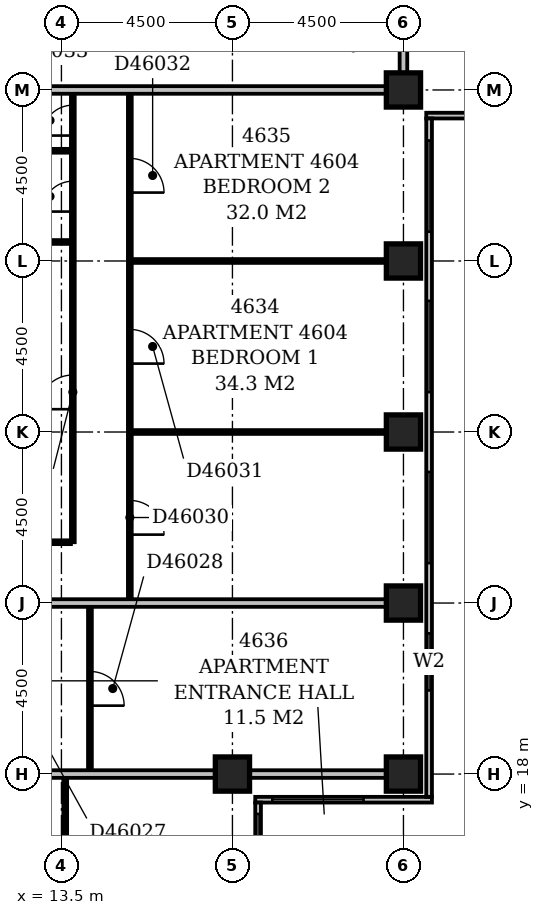
"""IFC4 building model, lengths in metres.
Left out: names, types, materials, properties, quantities, classifications, styles, units other than length and angle.
Written with IfcOpenShell. Run it as: python <this file> out.ifc"""

import sys

from ifc_helpers import new_model, si_unit, direction, frame, frame_2d, origin, origin_2d, place, context, subcontext, project, spatial, rectangle, extrude, element, fill, save


model = new_model("IFC4")
c1 = context("Model", 3, precision=1e-05, world=origin(), true_north=direction((0.0, 1.0)))
c2 = subcontext(c1, "Body", "Model", "MODEL_VIEW")
j1 = project(units=[si_unit("LENGTHUNIT", "METRE"), si_unit("PLANEANGLEUNIT", "RADIAN")], contexts=[c1])
p1 = place(None, origin())
s1 = spatial("IfcSite", under=j1, at=p1, CompositionType="ELEMENT")
p2 = place(p1, origin())
s2 = spatial("IfcBuilding", under=s1, at=p2, CompositionType="ELEMENT")
p3 = place(p2, frame((0.0, 0.0, 182.6)))
s3 = spatial("IfcBuildingStorey", under=s2, at=p3, CompositionType="ELEMENT", Elevation=182.6)
for number, where, z_axis, x_axis in (
    (1, (18.0, 18.0, -0.3), (0.0, 0.0, 1.0), (1.0, 0.0, 0.0)),
    (2, (22.5, 18.0, -0.3), (0.0, 0.0, 1.0), (1.0, 0.0, 0.0)),
    (3, (22.5, 22.5, -0.3), (0.0, 0.0, 1.0), (1.0, 0.0, 0.0)),
    (4, (22.5, 27.0, -0.3), (0.0, 0.0, 1.0), (1.0, 0.0, 0.0)),
    (5, (22.5, 31.5, -0.3), (0.0, 0.0, 1.0), (1.0, 0.0, 0.0)),
    (6, (22.5, 36.0, -0.3), (0.0, 0.0, 1.0), (1.0, 0.0, 0.0)),
):
    element("IfcColumn", number, at=place(p3, frame(where, z_axis=z_axis, x_axis=x_axis)), inside=s3, PredefinedType="COLUMN", context=c2, shape_type="SweptSolid", body=[
        extrude(rectangle(XDim=0.9, YDim=0.9, at=origin_2d()), origin(), (0.0, 0.0, 1.0), 3.55),
    ])
p4 = place(p3, frame((18.675, 8.4, 0.0), z_axis=(0.0, 0.0, 1.0), x_axis=(0.0, 1.0, 0.0)))
e7 = element("IfcWall", 7, at=p4, inside=s3, PredefinedType="STANDARD", context=c2, shape_type="SweptSolid", body=[
    extrude(rectangle(XDim=8.85, YDim=0.15, at=frame_2d((4.425, 0.0))), origin(), (0.0, 0.0, 1.0), 2.7),
])
p5 = place(p4, frame((1.871, 0.0, 0.6)))
e8 = element("IfcOpeningElement", 8, at=p5, cuts=e7, PredefinedType="OPENING", context=c2, shape_type="SweptSolid", body=[
    extrude(rectangle(XDim=2.4, YDim=1.8, at=frame_2d((1.2, 0.9))), frame((0.0, 0.087, 0.0), z_axis=(0.0, -1.0, 0.0), x_axis=(1.0, 0.0, 0.0)), (0.0, 0.0, 1.0), 0.174),
])
p6 = place(p4, frame((6.15, 0.0, 0.6)))
e9 = element("IfcOpeningElement", 9, at=p6, cuts=e7, PredefinedType="OPENING", context=c2, shape_type="SweptSolid", body=[
    extrude(rectangle(XDim=2.4, YDim=1.8, at=frame_2d((1.2, 0.9))), frame((0.0, 0.087, 0.0), z_axis=(0.0, -1.0, 0.0), x_axis=(1.0, 0.0, 0.0)), (0.0, 0.0, 1.0), 0.174),
])
p7 = place(p3, frame((18.6, 17.325, 0.0), z_axis=(0.0, 0.0, 1.0), x_axis=(1.0, 0.0, 0.0)))
e10 = element("IfcWall", 10, at=p7, inside=s3, PredefinedType="STANDARD", context=c2, shape_type="SweptSolid", body=[
    extrude(rectangle(XDim=4.65, YDim=0.15, at=frame_2d((2.325, 0.0))), origin(), (0.0, 0.0, 1.0), 2.7),
])
p8 = place(p7, frame((0.45, 0.0, 0.6)))
e11 = element("IfcOpeningElement", 11, at=p8, cuts=e10, PredefinedType="OPENING", context=c2, shape_type="SweptSolid", body=[
    extrude(rectangle(XDim=2.4, YDim=1.8, at=frame_2d((1.2, 0.9))), frame((0.0, 0.087, 0.0), z_axis=(0.0, -1.0, 0.0), x_axis=(1.0, 0.0, 0.0)), (0.0, 0.0, 1.0), 0.174),
])
p9 = place(p3, frame((23.175, 17.4, 0.0), z_axis=(0.0, 0.0, 1.0), x_axis=(0.0, 1.0, 0.0)))
e12 = element("IfcWall", 12, at=p9, inside=s3, PredefinedType="STANDARD", context=c2, shape_type="SweptSolid", body=[
    extrude(rectangle(XDim=17.85, YDim=0.15, at=frame_2d((8.925, 0.0))), origin(), (0.0, 0.0, 1.0), 2.7),
])
p10 = place(p9, frame((2.802, 0.0, 0.6)))
e13 = element("IfcOpeningElement", 13, at=p10, cuts=e12, PredefinedType="OPENING", context=c2, shape_type="SweptSolid", body=[
    extrude(rectangle(XDim=1.5, YDim=1.8, at=frame_2d((0.75, 0.9))), frame((0.0, 0.087, 0.0), z_axis=(0.0, -1.0, 0.0), x_axis=(1.0, 0.0, 0.0)), (0.0, 0.0, 1.0), 0.174),
])
p11 = place(p9, frame((6.15, 0.0, 0.6)))
e14 = element("IfcOpeningElement", 14, at=p11, cuts=e12, PredefinedType="OPENING", context=c2, shape_type="SweptSolid", body=[
    extrude(rectangle(XDim=2.4, YDim=1.8, at=frame_2d((1.2, 0.9))), frame((0.0, 0.087, 0.0), z_axis=(0.0, -1.0, 0.0), x_axis=(1.0, 0.0, 0.0)), (0.0, 0.0, 1.0), 0.174),
])
p12 = place(p9, frame((10.65, 0.0, 0.6)))
e15 = element("IfcOpeningElement", 15, at=p12, cuts=e12, PredefinedType="OPENING", context=c2, shape_type="SweptSolid", body=[
    extrude(rectangle(XDim=2.4, YDim=1.8, at=frame_2d((1.2, 0.9))), frame((0.0, 0.087, 0.0), z_axis=(0.0, -1.0, 0.0), x_axis=(1.0, 0.0, 0.0)), (0.0, 0.0, 1.0), 0.174),
])
p13 = place(p9, frame((14.869, 0.0, 0.6)))
e16 = element("IfcOpeningElement", 16, at=p13, cuts=e12, PredefinedType="OPENING", context=c2, shape_type="SweptSolid", body=[
    extrude(rectangle(XDim=2.4, YDim=1.8, at=frame_2d((1.2, 0.9))), frame((0.0, 0.087, 0.0), z_axis=(0.0, -1.0, 0.0), x_axis=(1.0, 0.0, 0.0)), (0.0, 0.0, 1.0), 0.174),
])
p14 = place(p3, frame((23.1, 35.325, 0.0), z_axis=(0.0, 0.0, 1.0), x_axis=(1.0, 0.0, 0.0)))
e17 = element("IfcWall", 17, at=p14, inside=s3, PredefinedType="STANDARD", context=c2, shape_type="SweptSolid", body=[
    extrude(rectangle(XDim=45.15, YDim=0.15, at=frame_2d((22.575, 0.0))), origin(), (0.0, 0.0, 1.0), 2.7),
])
p15 = place(p14, frame((1.989, 0.0, 0.6)))
e18 = element("IfcOpeningElement", 18, at=p15, cuts=e17, PredefinedType="OPENING", context=c2, shape_type="SweptSolid", body=[
    extrude(rectangle(XDim=1.2, YDim=1.8, at=frame_2d((0.6, 0.9))), frame((0.0, 0.087, 0.0), z_axis=(0.0, -1.0, 0.0), x_axis=(1.0, 0.0, 0.0)), (0.0, 0.0, 1.0), 0.174),
])
p16 = place(p14, frame((4.95, 0.0, 0.6)))
e19 = element("IfcOpeningElement", 19, at=p16, cuts=e17, PredefinedType="OPENING", context=c2, shape_type="SweptSolid", body=[
    extrude(rectangle(XDim=2.4, YDim=1.8, at=frame_2d((1.2, 0.9))), frame((0.0, 0.087, 0.0), z_axis=(0.0, -1.0, 0.0), x_axis=(1.0, 0.0, 0.0)), (0.0, 0.0, 1.0), 0.174),
])
p17 = place(p14, frame((9.45, 0.0, 0.6)))
e20 = element("IfcOpeningElement", 20, at=p17, cuts=e17, PredefinedType="OPENING", context=c2, shape_type="SweptSolid", body=[
    extrude(rectangle(XDim=2.4, YDim=1.8, at=frame_2d((1.2, 0.9))), frame((0.0, 0.087, 0.0), z_axis=(0.0, -1.0, 0.0), x_axis=(1.0, 0.0, 0.0)), (0.0, 0.0, 1.0), 0.174),
])
p18 = place(p14, frame((13.95, 0.0, 0.6)))
e21 = element("IfcOpeningElement", 21, at=p18, cuts=e17, PredefinedType="OPENING", context=c2, shape_type="SweptSolid", body=[
    extrude(rectangle(XDim=2.4, YDim=1.8, at=frame_2d((1.2, 0.9))), frame((0.0, 0.087, 0.0), z_axis=(0.0, -1.0, 0.0), x_axis=(1.0, 0.0, 0.0)), (0.0, 0.0, 1.0), 0.174),
])
p19 = place(p14, frame((18.45, 0.0, 0.6)))
e22 = element("IfcOpeningElement", 22, at=p19, cuts=e17, PredefinedType="OPENING", context=c2, shape_type="SweptSolid", body=[
    extrude(rectangle(XDim=2.4, YDim=1.8, at=frame_2d((1.2, 0.9))), frame((0.0, 0.087, 0.0), z_axis=(0.0, -1.0, 0.0), x_axis=(1.0, 0.0, 0.0)), (0.0, 0.0, 1.0), 0.174),
])
p20 = place(p14, frame((22.589, 0.0, 0.6)))
e23 = element("IfcOpeningElement", 23, at=p20, cuts=e17, PredefinedType="OPENING", context=c2, shape_type="SweptSolid", body=[
    extrude(rectangle(XDim=2.1, YDim=1.8, at=frame_2d((1.05, 0.9))), frame((0.0, 0.087, 0.0), z_axis=(0.0, -1.0, 0.0), x_axis=(1.0, 0.0, 0.0)), (0.0, 0.0, 1.0), 0.174),
])
p21 = place(p14, frame((28.653, 0.0, 0.6)))
e24 = element("IfcOpeningElement", 24, at=p21, cuts=e17, PredefinedType="OPENING", context=c2, shape_type="SweptSolid", body=[
    extrude(rectangle(XDim=1.5, YDim=1.8, at=frame_2d((0.75, 0.9))), frame((0.0, 0.087, 0.0), z_axis=(0.0, -1.0, 0.0), x_axis=(1.0, 0.0, 0.0)), (0.0, 0.0, 1.0), 0.174),
])
p22 = place(p14, frame((31.95, 0.0, 0.6)))
e25 = element("IfcOpeningElement", 25, at=p22, cuts=e17, PredefinedType="OPENING", context=c2, shape_type="SweptSolid", body=[
    extrude(rectangle(XDim=2.4, YDim=1.8, at=frame_2d((1.2, 0.9))), frame((0.0, 0.087, 0.0), z_axis=(0.0, -1.0, 0.0), x_axis=(1.0, 0.0, 0.0)), (0.0, 0.0, 1.0), 0.174),
])
p23 = place(p14, frame((36.45, 0.0, 0.6)))
e26 = element("IfcOpeningElement", 26, at=p23, cuts=e17, PredefinedType="OPENING", context=c2, shape_type="SweptSolid", body=[
    extrude(rectangle(XDim=2.4, YDim=1.8, at=frame_2d((1.2, 0.9))), frame((0.0, 0.087, 0.0), z_axis=(0.0, -1.0, 0.0), x_axis=(1.0, 0.0, 0.0)), (0.0, 0.0, 1.0), 0.174),
])
p24 = place(p14, frame((40.95, 0.0, 0.6)))
e27 = element("IfcOpeningElement", 27, at=p24, cuts=e17, PredefinedType="OPENING", context=c2, shape_type="SweptSolid", body=[
    extrude(rectangle(XDim=2.4, YDim=1.8, at=frame_2d((1.2, 0.9))), frame((0.0, 0.087, 0.0), z_axis=(0.0, -1.0, 0.0), x_axis=(1.0, 0.0, 0.0)), (0.0, 0.0, 1.0), 0.174),
])
p25 = place(p3, frame((13.6, 9.45, 0.0), z_axis=(0.0, 0.0, 1.0), x_axis=(0.0, 1.0, 0.0)))
e28 = element("IfcWall", 28, at=p25, inside=s3, PredefinedType="PARTITIONING", context=c2, shape_type="SweptSolid", body=[
    extrude(rectangle(XDim=8.45, YDim=0.1, at=frame_2d((4.225, 0.0))), origin(), (0.0, 0.0, 1.0), 3.25),
])
p26 = place(p25, frame((1.35, 0.0, 0.0)))
e29 = element("IfcOpeningElement", 29, at=p26, cuts=e28, PredefinedType="OPENING", context=c2, shape_type="SweptSolid", body=[
    extrude(rectangle(XDim=0.9, YDim=2.1, at=frame_2d((0.45, 1.05))), frame((0.0, 0.062, 0.0), z_axis=(0.0, -1.0, 0.0), x_axis=(1.0, 0.0, 0.0)), (0.0, 0.0, 1.0), 0.124),
])
p27 = place(p25, frame((5.85, 0.0, 0.0)))
e30 = element("IfcOpeningElement", 30, at=p27, cuts=e28, PredefinedType="OPENING", context=c2, shape_type="SweptSolid", body=[
    extrude(rectangle(XDim=0.9, YDim=2.1, at=frame_2d((0.45, 1.05))), frame((0.0, 0.062, 0.0), z_axis=(0.0, -1.0, 0.0), x_axis=(1.0, 0.0, 0.0)), (0.0, 0.0, 1.0), 0.124),
])
p28 = place(p3, frame((9.1, 18.0, 0.0), z_axis=(0.0, 0.0, 1.0), x_axis=(1.0, 0.0, 0.0)))
e31 = element("IfcWall", 31, at=p28, inside=s3, PredefinedType="PARTITIONING", context=c2, shape_type="SweptSolid", body=[
    extrude(rectangle(XDim=8.45, YDim=0.2, at=frame_2d((4.225, 0.0))), origin(), (0.0, 0.0, 1.0), 2.55),
])
p29 = place(p3, frame((18.45, 18.0, 0.0), z_axis=(0.0, 0.0, 1.0), x_axis=(1.0, 0.0, 0.0)))
e32 = element("IfcWall", 32, at=p29, inside=s3, PredefinedType="PARTITIONING", context=c2, shape_type="SweptSolid", body=[
    extrude(rectangle(XDim=3.6, YDim=0.2, at=frame_2d((1.8, 0.0))), origin(), (0.0, 0.0, 1.0), 2.7),
])
p30 = place(p3, frame((14.25, 18.1, 0.0), z_axis=(0.0, 0.0, 1.0), x_axis=(0.0, 1.0, 0.0)))
e33 = element("IfcWall", 33, at=p30, inside=s3, PredefinedType="PARTITIONING", context=c2, shape_type="SweptSolid", body=[
    extrude(rectangle(XDim=4.3, YDim=0.1, at=frame_2d((2.15, 0.0))), origin(), (0.0, 0.0, 1.0), 3.25),
])
p31 = place(p30, frame((1.7, 0.0, 0.0)))
e34 = element("IfcOpeningElement", 34, at=p31, cuts=e33, PredefinedType="OPENING", context=c2, shape_type="SweptSolid", body=[
    extrude(rectangle(XDim=0.9, YDim=2.1, at=frame_2d((0.45, 1.05))), frame((0.0, 0.062, 0.0), z_axis=(0.0, -1.0, 0.0), x_axis=(1.0, 0.0, 0.0)), (0.0, 0.0, 1.0), 0.124),
])
p32 = place(p3, frame((9.1, 22.5, 0.0), z_axis=(0.0, 0.0, 1.0), x_axis=(1.0, 0.0, 0.0)))
e35 = element("IfcWall", 35, at=p32, inside=s3, PredefinedType="PARTITIONING", context=c2, shape_type="SweptSolid", body=[
    extrude(rectangle(XDim=12.95, YDim=0.2, at=frame_2d((6.475, 0.0))), origin(), (0.0, 0.0, 1.0), 3.25),
])
p33 = place(p3, frame((15.3, 22.6, 0.0), z_axis=(0.0, 0.0, 1.0), x_axis=(0.0, 1.0, 0.0)))
e36 = element("IfcWall", 36, at=p33, inside=s3, PredefinedType="PARTITIONING", context=c2, shape_type="SweptSolid", body=[
    extrude(rectangle(XDim=13.3, YDim=0.1, at=frame_2d((6.65, 0.0))), origin(), (0.0, 0.0, 1.0), 3.25),
])
p34 = place(p33, frame((1.7, 0.0, 0.0)))
e37 = element("IfcOpeningElement", 37, at=p34, cuts=e36, PredefinedType="OPENING", context=c2, shape_type="SweptSolid", body=[
    extrude(rectangle(XDim=0.9, YDim=2.1, at=frame_2d((0.45, 1.05))), frame((0.0, 0.062, 0.0), z_axis=(0.0, -1.0, 0.0), x_axis=(1.0, 0.0, 0.0)), (0.0, 0.0, 1.0), 0.124),
])
p35 = place(p33, frame((6.2, 0.0, 0.0)))
e38 = element("IfcOpeningElement", 38, at=p35, cuts=e36, PredefinedType="OPENING", context=c2, shape_type="SweptSolid", body=[
    extrude(rectangle(XDim=0.9, YDim=2.1, at=frame_2d((0.45, 1.05))), frame((0.0, 0.062, 0.0), z_axis=(0.0, -1.0, 0.0), x_axis=(1.0, 0.0, 0.0)), (0.0, 0.0, 1.0), 0.124),
])
p36 = place(p33, frame((10.7, 0.0, 0.0)))
e39 = element("IfcOpeningElement", 39, at=p36, cuts=e36, PredefinedType="OPENING", context=c2, shape_type="SweptSolid", body=[
    extrude(rectangle(XDim=0.9, YDim=2.1, at=frame_2d((0.45, 1.05))), frame((0.0, 0.062, 0.0), z_axis=(0.0, -1.0, 0.0), x_axis=(1.0, 0.0, 0.0)), (0.0, 0.0, 1.0), 0.124),
])
p37 = place(p3, frame((9.1, 24.1, 0.0), z_axis=(0.0, 0.0, 1.0), x_axis=(1.0, 0.0, 0.0)))
e40 = element("IfcWall", 40, at=p37, inside=s3, PredefinedType="PARTITIONING", context=c2, shape_type="SweptSolid", body=[
    extrude(rectangle(XDim=4.65, YDim=0.1, at=frame_2d((2.325, 0.0))), origin(), (0.0, 0.0, 1.0), 3.25),
])
p38 = place(p3, frame((13.8, 24.1, 0.0), z_axis=(0.0, 0.0, 1.0), x_axis=(0.0, 1.0, 0.0)))
e41 = element("IfcWall", 41, at=p38, inside=s3, PredefinedType="PARTITIONING", context=c2, shape_type="SweptSolid", body=[
    extrude(rectangle(XDim=11.8, YDim=0.1, at=frame_2d((5.9, 0.0))), origin(), (0.0, 0.0, 1.0), 3.25),
])
p39 = place(p38, frame((8.7, 0.0, 0.0)))
e42 = element("IfcOpeningElement", 42, at=p39, cuts=e41, PredefinedType="OPENING", context=c2, shape_type="SweptSolid", body=[
    extrude(rectangle(XDim=0.8, YDim=2.1, at=frame_2d((0.4, 1.05))), frame((0.0, 0.062, 0.0), z_axis=(0.0, -1.0, 0.0), x_axis=(1.0, 0.0, 0.0)), (0.0, 0.0, 1.0), 0.124),
])
p40 = place(p38, frame((3.5, 0.0, 0.0)))
e43 = element("IfcOpeningElement", 43, at=p40, cuts=e41, PredefinedType="OPENING", context=c2, shape_type="SweptSolid", body=[
    extrude(rectangle(XDim=0.9, YDim=2.1, at=frame_2d((0.45, 1.05))), frame((0.0, 0.062, 0.0), z_axis=(0.0, -1.0, 0.0), x_axis=(1.0, 0.0, 0.0)), (0.0, 0.0, 1.0), 0.124),
])
p41 = place(p38, frame((10.7, 0.0, 0.0)))
e44 = element("IfcOpeningElement", 44, at=p41, cuts=e41, PredefinedType="OPENING", context=c2, shape_type="SweptSolid", body=[
    extrude(rectangle(XDim=0.8, YDim=2.1, at=frame_2d((0.4, 1.05))), frame((0.0, 0.062, 0.0), z_axis=(0.0, -1.0, 0.0), x_axis=(1.0, 0.0, 0.0)), (0.0, 0.0, 1.0), 0.124),
])
p42 = place(p3, frame((15.35, 27.0, 0.0), z_axis=(0.0, 0.0, 1.0), x_axis=(1.0, 0.0, 0.0)))
e45 = element("IfcWall", 45, at=p42, inside=s3, PredefinedType="PARTITIONING", context=c2, shape_type="SweptSolid", body=[
    extrude(rectangle(XDim=6.7, YDim=0.1, at=frame_2d((3.35, 0.0))), origin(), (0.0, 0.0, 1.0), 2.65),
])
p43 = place(p3, frame((15.35, 31.5, 0.0), z_axis=(0.0, 0.0, 1.0), x_axis=(1.0, 0.0, 0.0)))
e46 = element("IfcWall", 46, at=p43, inside=s3, PredefinedType="PARTITIONING", context=c2, shape_type="SweptSolid", body=[
    extrude(rectangle(XDim=6.7, YDim=0.1, at=frame_2d((3.35, 0.0))), origin(), (0.0, 0.0, 1.0), 3.25),
])
for number, where, z_axis, x_axis in (
    (47, (9.1, 32.0, 0.0), (0.0, 0.0, 1.0), (1.0, 0.0, 0.0)),
    (48, (9.1, 34.4, 0.0), (0.0, 0.0, 1.0), (1.0, 0.0, 0.0)),
):
    element("IfcWall", number, at=place(p3, frame(where, z_axis=z_axis, x_axis=x_axis)), inside=s3, PredefinedType="PLUMBINGWALL", context=c2, shape_type="SweptSolid", body=[
        extrude(rectangle(XDim=4.65, YDim=0.1, at=frame_2d((2.325, 0.0))), origin(), (0.0, 0.0, 1.0), 3.25),
    ])
p44 = place(p3, frame((9.1, 36.0, 0.0), z_axis=(0.0, 0.0, 1.0), x_axis=(1.0, 0.0, 0.0)))
e49 = element("IfcWall", 49, at=p44, inside=s3, PredefinedType="PARTITIONING", context=c2, shape_type="SweptSolid", body=[
    extrude(rectangle(XDim=12.95, YDim=0.2, at=frame_2d((6.475, 0.0))), origin(), (0.0, 0.0, 1.0), 3.25),
])
p45 = place(p3, frame((22.5, 36.45, 0.0), z_axis=(0.0, 0.0, 1.0), x_axis=(0.0, 1.0, 0.0)))
e50 = element("IfcWall", 50, at=p45, inside=s3, PredefinedType="PARTITIONING", context=c2, shape_type="SweptSolid", body=[
    extrude(rectangle(XDim=13.05, YDim=0.2, at=frame_2d((6.525, 0.0))), origin(), (0.0, 0.0, 1.0), 3.25),
])
p46 = place(p6, origin())
e51 = element("IfcWindow", 51, at=p46, inside=s3, PartitioningType="SINGLE_PANEL", PredefinedType="WINDOW", context=c2, shape_type="SweptSolid", body=[
    extrude(rectangle(XDim=2.4, YDim=1.8, at=frame_2d((1.2, 0.9))), frame((0.0, 0.03, 0.0), z_axis=(0.0, -1.0, 0.0), x_axis=(1.0, 0.0, 0.0)), (0.0, 0.0, 1.0), 0.06),
])
fill(e9, e51)
p47 = place(p8, origin())
e52 = element("IfcWindow", 52, at=p47, inside=s3, PartitioningType="SINGLE_PANEL", PredefinedType="WINDOW", context=c2, shape_type="SweptSolid", body=[
    extrude(rectangle(XDim=2.4, YDim=1.8, at=frame_2d((1.2, 0.9))), frame((0.0, 0.03, 0.0), z_axis=(0.0, -1.0, 0.0), x_axis=(1.0, 0.0, 0.0)), (0.0, 0.0, 1.0), 0.06),
])
fill(e11, e52)
p48 = place(p10, origin())
e53 = element("IfcWindow", 53, at=p48, inside=s3, PartitioningType="SINGLE_PANEL", PredefinedType="WINDOW", context=c2, shape_type="SweptSolid", body=[
    extrude(rectangle(XDim=1.5, YDim=1.8, at=frame_2d((0.75, 0.9))), frame((0.0, 0.03, 0.0), z_axis=(0.0, -1.0, 0.0), x_axis=(1.0, 0.0, 0.0)), (0.0, 0.0, 1.0), 0.06),
])
fill(e13, e53)
p49 = place(p11, origin())
e54 = element("IfcWindow", 54, at=p49, inside=s3, PartitioningType="SINGLE_PANEL", PredefinedType="WINDOW", context=c2, shape_type="SweptSolid", body=[
    extrude(rectangle(XDim=2.4, YDim=1.8, at=frame_2d((1.2, 0.9))), frame((0.0, 0.03, 0.0), z_axis=(0.0, -1.0, 0.0), x_axis=(1.0, 0.0, 0.0)), (0.0, 0.0, 1.0), 0.06),
])
fill(e14, e54)
p50 = place(p12, origin())
e55 = element("IfcWindow", 55, at=p50, inside=s3, PartitioningType="SINGLE_PANEL", PredefinedType="WINDOW", context=c2, shape_type="SweptSolid", body=[
    extrude(rectangle(XDim=2.4, YDim=1.8, at=frame_2d((1.2, 0.9))), frame((0.0, 0.03, 0.0), z_axis=(0.0, -1.0, 0.0), x_axis=(1.0, 0.0, 0.0)), (0.0, 0.0, 1.0), 0.06),
])
fill(e15, e55)
p51 = place(p13, origin())
e56 = element("IfcWindow", 56, at=p51, inside=s3, PartitioningType="SINGLE_PANEL", PredefinedType="WINDOW", context=c2, shape_type="SweptSolid", body=[
    extrude(rectangle(XDim=2.4, YDim=1.8, at=frame_2d((1.2, 0.9))), frame((0.0, 0.03, 0.0), z_axis=(0.0, -1.0, 0.0), x_axis=(1.0, 0.0, 0.0)), (0.0, 0.0, 1.0), 0.06),
])
fill(e16, e56)
p52 = place(p31, frame((0.9, 0.0, 0.0), z_axis=(0.0, 0.0, 1.0), x_axis=(-1.0, 0.0, 0.0)))
e57 = element("IfcDoor", 57, at=p52, inside=s3, OperationType="SINGLE_SWING_RIGHT", PredefinedType="DOOR", context=c2, shape_type="SweptSolid", body=[
    extrude(rectangle(XDim=0.9, YDim=2.1, at=frame_2d((0.45, 1.05))), frame((0.0, 0.025, 0.0), z_axis=(0.0, -1.0, 0.0), x_axis=(1.0, 0.0, 0.0)), (0.0, 0.0, 1.0), 0.05),
])
fill(e34, e57)
p53 = place(p34, frame((0.9, 0.0, 0.0), z_axis=(0.0, 0.0, 1.0), x_axis=(-1.0, 0.0, 0.0)))
e58 = element("IfcDoor", 58, at=p53, inside=s3, OperationType="SINGLE_SWING_RIGHT", PredefinedType="DOOR", context=c2, shape_type="SweptSolid", body=[
    extrude(rectangle(XDim=0.9, YDim=2.1, at=frame_2d((0.45, 1.05))), frame((0.0, 0.025, 0.0), z_axis=(0.0, -1.0, 0.0), x_axis=(1.0, 0.0, 0.0)), (0.0, 0.0, 1.0), 0.05),
])
fill(e37, e58)
p54 = place(p35, frame((0.9, 0.0, 0.0), z_axis=(0.0, 0.0, 1.0), x_axis=(-1.0, 0.0, 0.0)))
e59 = element("IfcDoor", 59, at=p54, inside=s3, OperationType="SINGLE_SWING_RIGHT", PredefinedType="DOOR", context=c2, shape_type="SweptSolid", body=[
    extrude(rectangle(XDim=0.9, YDim=2.1, at=frame_2d((0.45, 1.05))), frame((0.0, 0.025, 0.0), z_axis=(0.0, -1.0, 0.0), x_axis=(1.0, 0.0, 0.0)), (0.0, 0.0, 1.0), 0.05),
])
fill(e38, e59)
p55 = place(p36, frame((0.9, 0.0, 0.0), z_axis=(0.0, 0.0, 1.0), x_axis=(-1.0, 0.0, 0.0)))
e60 = element("IfcDoor", 60, at=p55, inside=s3, OperationType="SINGLE_SWING_RIGHT", PredefinedType="DOOR", context=c2, shape_type="SweptSolid", body=[
    extrude(rectangle(XDim=0.9, YDim=2.1, at=frame_2d((0.45, 1.05))), frame((0.0, 0.025, 0.0), z_axis=(0.0, -1.0, 0.0), x_axis=(1.0, 0.0, 0.0)), (0.0, 0.0, 1.0), 0.05),
])
fill(e39, e60)
p56 = place(p39, origin())
e61 = element("IfcDoor", 61, at=p56, inside=s3, OperationType="SINGLE_SWING_LEFT", PredefinedType="DOOR", context=c2, shape_type="SweptSolid", body=[
    extrude(rectangle(XDim=0.8, YDim=2.1, at=frame_2d((0.4, 1.05))), frame((0.0, 0.025, 0.0), z_axis=(0.0, -1.0, 0.0), x_axis=(1.0, 0.0, 0.0)), (0.0, 0.0, 1.0), 0.05),
])
fill(e42, e61)
p57 = place(p40, origin())
e62 = element("IfcDoor", 62, at=p57, inside=s3, OperationType="SINGLE_SWING_LEFT", PredefinedType="DOOR", context=c2, shape_type="SweptSolid", body=[
    extrude(rectangle(XDim=0.9, YDim=2.1, at=frame_2d((0.45, 1.05))), frame((0.0, 0.025, 0.0), z_axis=(0.0, -1.0, 0.0), x_axis=(1.0, 0.0, 0.0)), (0.0, 0.0, 1.0), 0.05),
])
fill(e43, e62)
p58 = place(p41, origin())
e63 = element("IfcDoor", 63, at=p58, inside=s3, OperationType="SINGLE_SWING_LEFT", PredefinedType="DOOR", context=c2, shape_type="SweptSolid", body=[
    extrude(rectangle(XDim=0.8, YDim=2.1, at=frame_2d((0.4, 1.05))), frame((0.0, 0.025, 0.0), z_axis=(0.0, -1.0, 0.0), x_axis=(1.0, 0.0, 0.0)), (0.0, 0.0, 1.0), 0.05),
])
fill(e44, e63)
save(model, sys.argv[1])
